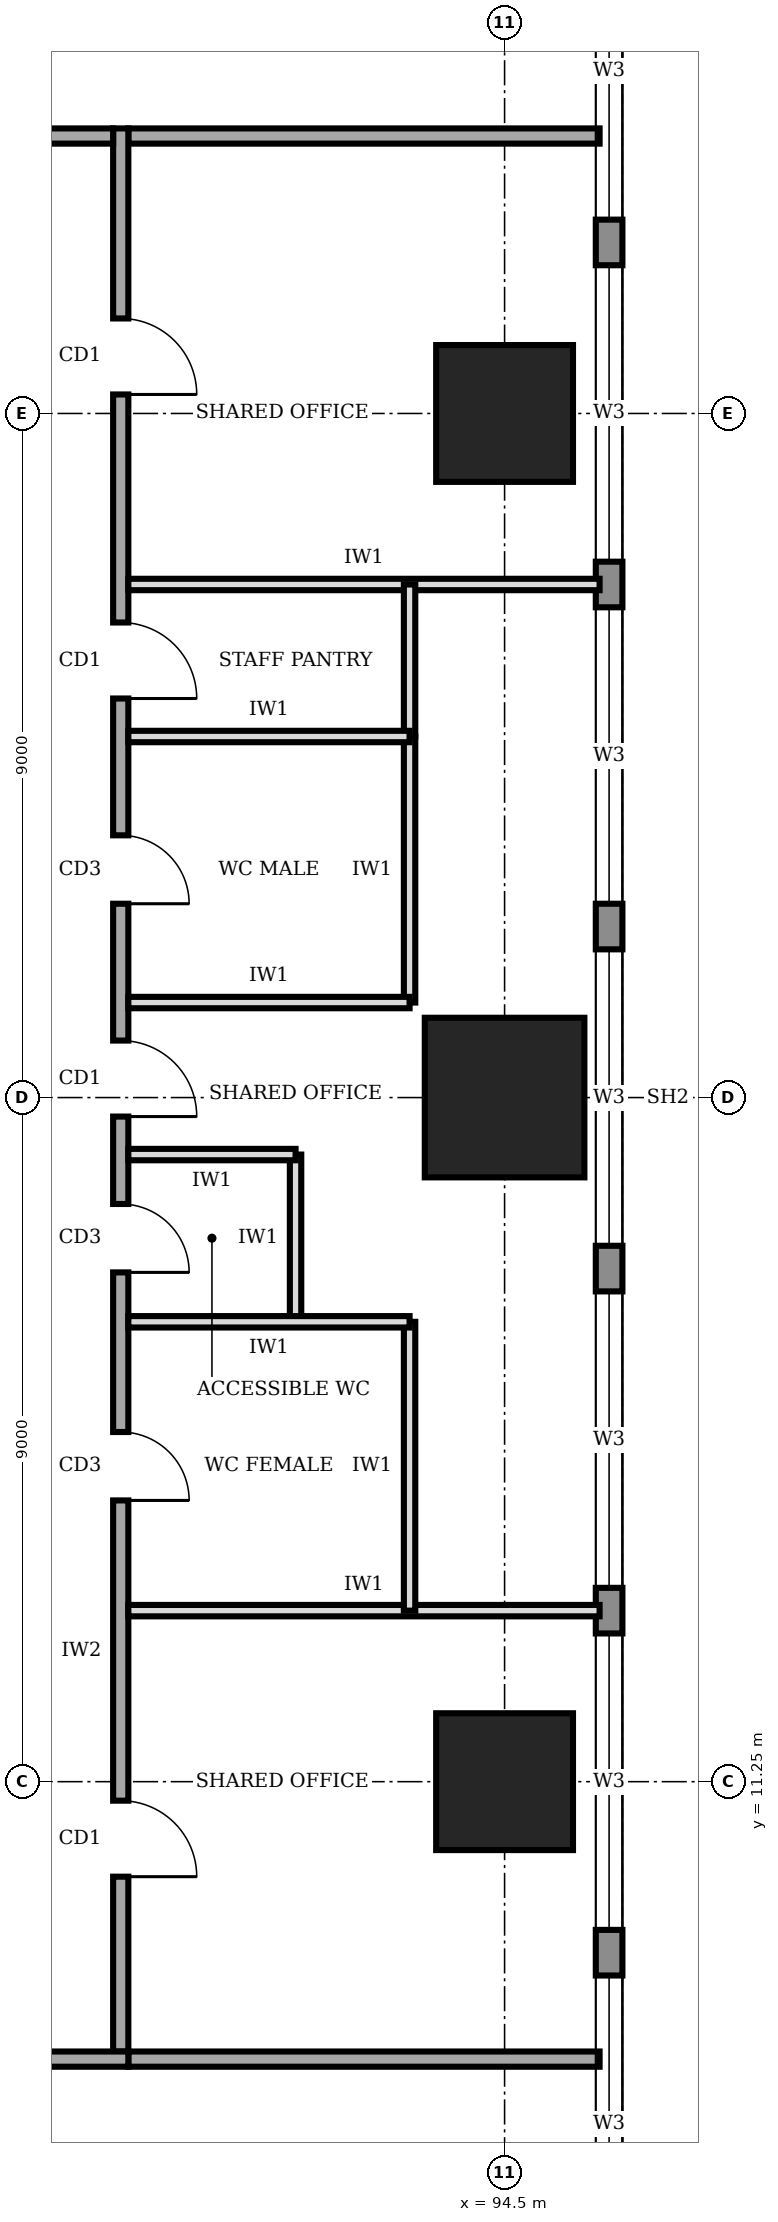
"""IFC4 building model, lengths in metres.
Left out: names, types, materials, properties, quantities, classifications, styles, units other than length and angle.
Written with IfcOpenShell. Run it as: python <this file> out.ifc"""

import sys

from ifc_helpers import new_model, si_unit, direction, frame, frame_2d, origin, origin_2d, place, context, subcontext, project, spatial, rectangle, extrude, element, fill, save


model = new_model("IFC4")
c1 = context("Model", 3, precision=1e-05, world=origin(), true_north=direction((0.0, 1.0)))
c2 = subcontext(c1, "Body", "Model", "MODEL_VIEW")
j1 = project(units=[si_unit("LENGTHUNIT", "METRE"), si_unit("PLANEANGLEUNIT", "RADIAN")], contexts=[c1])
p1 = place(None, origin())
s1 = spatial("IfcSite", under=j1, at=p1, CompositionType="ELEMENT")
p2 = place(p1, origin())
s2 = spatial("IfcBuilding", under=s1, at=p2, CompositionType="ELEMENT")
p3 = place(p2, frame((0.0, 0.0, 193.0)))
s3 = spatial("IfcBuildingStorey", under=s2, at=p3, CompositionType="ELEMENT", Elevation=193.0)
p4 = place(p3, frame((94.5, 11.25, 0.0), z_axis=(0.0, 0.0, 1.0), x_axis=(1.0, 0.0, 0.0)))
e1 = element("IfcColumn", 1, at=p4, inside=s3, PredefinedType="COLUMN", context=c2, shape_type="SweptSolid", body=[
    extrude(rectangle(XDim=1.8, YDim=1.8, at=origin_2d()), origin(), (0.0, 0.0, 1.0), 4.0),
])
p5 = place(p3, frame((94.5, 20.25, 0.0), z_axis=(0.0, 0.0, 1.0), x_axis=(1.0, 0.0, 0.0)))
e2 = element("IfcColumn", 2, at=p5, inside=s3, PredefinedType="COLUMN", context=c2, shape_type="SweptSolid", body=[
    extrude(rectangle(XDim=2.1, YDim=2.1, at=origin_2d()), origin(), (0.0, 0.0, 1.0), 4.0),
])
p6 = place(p3, frame((94.5, 29.25, 0.0), z_axis=(0.0, 0.0, 1.0), x_axis=(1.0, 0.0, 0.0)))
e3 = element("IfcColumn", 3, at=p6, inside=s3, PredefinedType="COLUMN", context=c2, shape_type="SweptSolid", body=[
    extrude(rectangle(XDim=1.8, YDim=1.8, at=origin_2d()), origin(), (0.0, 0.0, 1.0), 4.0),
])
p7 = place(p3, frame((95.875, 3.32, 0.0), z_axis=(0.0, 0.0, 1.0), x_axis=(0.0, 1.0, 0.0)))
e4 = element("IfcWall", 4, at=p7, inside=s3, PredefinedType="STANDARD", context=c2, shape_type="SweptSolid", body=[
    extrude(rectangle(XDim=33.86, YDim=0.35, at=frame_2d((16.93, 0.0))), origin(), (0.0, 0.0, 1.0), 3.75),
])
p8 = place(p7, frame((1.48, 0.0, 0.95)))
e5 = element("IfcOpeningElement", 5, at=p8, cuts=e4, PredefinedType="OPENING", context=c2, shape_type="SweptSolid", body=[
    extrude(rectangle(XDim=3.9, YDim=1.8, at=frame_2d((1.95, 0.9))), frame((0.0, 0.185, 0.0), z_axis=(0.0, -1.0, 0.0), x_axis=(1.0, 0.0, 0.0)), (0.0, 0.0, 1.0), 0.37),
])
p9 = place(p7, frame((5.98, 0.0, 0.95)))
e6 = element("IfcOpeningElement", 6, at=p9, cuts=e4, PredefinedType="OPENING", context=c2, shape_type="SweptSolid", body=[
    extrude(rectangle(XDim=3.9, YDim=1.8, at=frame_2d((1.95, 0.9))), frame((0.0, 0.185, 0.0), z_axis=(0.0, -1.0, 0.0), x_axis=(1.0, 0.0, 0.0)), (0.0, 0.0, 1.0), 0.37),
])
p10 = place(p7, frame((10.48, 0.0, 0.95)))
e7 = element("IfcOpeningElement", 7, at=p10, cuts=e4, PredefinedType="OPENING", context=c2, shape_type="SweptSolid", body=[
    extrude(rectangle(XDim=3.9, YDim=1.8, at=frame_2d((1.95, 0.9))), frame((0.0, 0.185, 0.0), z_axis=(0.0, -1.0, 0.0), x_axis=(1.0, 0.0, 0.0)), (0.0, 0.0, 1.0), 0.37),
])
p11 = place(p7, frame((14.98, 0.0, 0.95)))
e8 = element("IfcOpeningElement", 8, at=p11, cuts=e4, PredefinedType="OPENING", context=c2, shape_type="SweptSolid", body=[
    extrude(rectangle(XDim=3.9, YDim=1.8, at=frame_2d((1.95, 0.9))), frame((0.0, 0.185, 0.0), z_axis=(0.0, -1.0, 0.0), x_axis=(1.0, 0.0, 0.0)), (0.0, 0.0, 1.0), 0.37),
])
p12 = place(p7, frame((19.48, 0.0, 0.95)))
e9 = element("IfcOpeningElement", 9, at=p12, cuts=e4, PredefinedType="OPENING", context=c2, shape_type="SweptSolid", body=[
    extrude(rectangle(XDim=3.9, YDim=1.8, at=frame_2d((1.95, 0.9))), frame((0.0, 0.185, 0.0), z_axis=(0.0, -1.0, 0.0), x_axis=(1.0, 0.0, 0.0)), (0.0, 0.0, 1.0), 0.37),
])
p13 = place(p7, frame((23.98, 0.0, 0.95)))
e10 = element("IfcOpeningElement", 10, at=p13, cuts=e4, PredefinedType="OPENING", context=c2, shape_type="SweptSolid", body=[
    extrude(rectangle(XDim=3.9, YDim=1.8, at=frame_2d((1.95, 0.9))), frame((0.0, 0.185, 0.0), z_axis=(0.0, -1.0, 0.0), x_axis=(1.0, 0.0, 0.0)), (0.0, 0.0, 1.0), 0.37),
])
p14 = place(p7, frame((28.48, 0.0, 0.95)))
e11 = element("IfcOpeningElement", 11, at=p14, cuts=e4, PredefinedType="OPENING", context=c2, shape_type="SweptSolid", body=[
    extrude(rectangle(XDim=3.9, YDim=1.8, at=frame_2d((1.95, 0.9))), frame((0.0, 0.185, 0.0), z_axis=(0.0, -1.0, 0.0), x_axis=(1.0, 0.0, 0.0)), (0.0, 0.0, 1.0), 0.37),
])
p15 = place(p3, frame((72.65, 7.6, 0.0), z_axis=(0.0, 0.0, 1.0), x_axis=(1.0, 0.0, 0.0)))
e12 = element("IfcWall", 12, at=p15, inside=s3, PredefinedType="SOLIDWALL", context=c2, shape_type="SweptSolid", body=[
    extrude(rectangle(XDim=16.9, YDim=0.2, at=frame_2d((8.45, 0.0))), origin(), (0.0, 0.0, 1.0), 3.75),
])
p16 = place(p15, frame((3.575, 0.0, 0.0)))
e13 = element("IfcOpeningElement", 13, at=p16, cuts=e12, PredefinedType="OPENING", context=c2, shape_type="SweptSolid", body=[
    extrude(rectangle(XDim=1.0, YDim=2.1, at=frame_2d((0.5, 1.05))), frame((0.0, 0.11, 0.0), z_axis=(0.0, -1.0, 0.0), x_axis=(1.0, 0.0, 0.0)), (0.0, 0.0, 1.0), 0.22),
])
p17 = place(p3, frame((89.45, 7.7, 0.0), z_axis=(0.0, 0.0, 1.0), x_axis=(0.0, 1.0, 0.0)))
e14 = element("IfcWall", 14, at=p17, inside=s3, PredefinedType="SOLIDWALL", context=c2, shape_type="SweptSolid", body=[
    extrude(rectangle(XDim=25.3, YDim=0.2, at=frame_2d((12.65, 0.0))), origin(), (0.0, 0.0, 1.0), 3.75),
])
p18 = place(p17, frame((2.3, 0.0, 0.0)))
e15 = element("IfcOpeningElement", 15, at=p18, cuts=e14, PredefinedType="OPENING", context=c2, shape_type="SweptSolid", body=[
    extrude(rectangle(XDim=1.0, YDim=2.1, at=frame_2d((0.5, 1.05))), frame((0.0, 0.11, 0.0), z_axis=(0.0, -1.0, 0.0), x_axis=(1.0, 0.0, 0.0)), (0.0, 0.0, 1.0), 0.22),
])
p19 = place(p17, frame((7.25, 0.0, 0.0)))
e16 = element("IfcOpeningElement", 16, at=p19, cuts=e14, PredefinedType="OPENING", context=c2, shape_type="SweptSolid", body=[
    extrude(rectangle(XDim=0.9, YDim=2.1, at=frame_2d((0.45, 1.05))), frame((0.0, 0.11, 0.0), z_axis=(0.0, -1.0, 0.0), x_axis=(1.0, 0.0, 0.0)), (0.0, 0.0, 1.0), 0.22),
])
p20 = place(p17, frame((10.25, 0.0, 0.0)))
e17 = element("IfcOpeningElement", 17, at=p20, cuts=e14, PredefinedType="OPENING", context=c2, shape_type="SweptSolid", body=[
    extrude(rectangle(XDim=0.9, YDim=2.1, at=frame_2d((0.45, 1.05))), frame((0.0, 0.11, 0.0), z_axis=(0.0, -1.0, 0.0), x_axis=(1.0, 0.0, 0.0)), (0.0, 0.0, 1.0), 0.22),
])
p21 = place(p17, frame((15.1, 0.0, 0.0)))
e18 = element("IfcOpeningElement", 18, at=p21, cuts=e14, PredefinedType="OPENING", context=c2, shape_type="SweptSolid", body=[
    extrude(rectangle(XDim=0.9, YDim=2.1, at=frame_2d((0.45, 1.05))), frame((0.0, 0.11, 0.0), z_axis=(0.0, -1.0, 0.0), x_axis=(1.0, 0.0, 0.0)), (0.0, 0.0, 1.0), 0.22),
])
p22 = place(p17, frame((17.8, 0.0, 0.0)))
e19 = element("IfcOpeningElement", 19, at=p22, cuts=e14, PredefinedType="OPENING", context=c2, shape_type="SweptSolid", body=[
    extrude(rectangle(XDim=1.0, YDim=2.1, at=frame_2d((0.5, 1.05))), frame((0.0, 0.11, 0.0), z_axis=(0.0, -1.0, 0.0), x_axis=(1.0, 0.0, 0.0)), (0.0, 0.0, 1.0), 0.22),
])
p23 = place(p17, frame((12.3, 0.0, 0.0)))
e20 = element("IfcOpeningElement", 20, at=p23, cuts=e14, PredefinedType="OPENING", context=c2, shape_type="SweptSolid", body=[
    extrude(rectangle(XDim=1.0, YDim=2.1, at=frame_2d((0.5, 1.05))), frame((0.0, 0.11, 0.0), z_axis=(0.0, -1.0, 0.0), x_axis=(1.0, 0.0, 0.0)), (0.0, 0.0, 1.0), 0.22),
])
p24 = place(p17, frame((21.8, 0.0, 0.0)))
e21 = element("IfcOpeningElement", 21, at=p24, cuts=e14, PredefinedType="OPENING", context=c2, shape_type="SweptSolid", body=[
    extrude(rectangle(XDim=1.0, YDim=2.1, at=frame_2d((0.5, 1.05))), frame((0.0, 0.11, 0.0), z_axis=(0.0, -1.0, 0.0), x_axis=(1.0, 0.0, 0.0)), (0.0, 0.0, 1.0), 0.22),
])
p25 = place(p3, frame((89.35, 32.9, 0.0), z_axis=(0.0, 0.0, 1.0), x_axis=(-1.0, 0.0, 0.0)))
e22 = element("IfcWall", 22, at=p25, inside=s3, PredefinedType="SOLIDWALL", context=c2, shape_type="SweptSolid", body=[
    extrude(rectangle(XDim=16.9, YDim=0.2, at=frame_2d((8.45, 0.0))), origin(), (0.0, 0.0, 1.0), 3.75),
])
p26 = place(p25, frame((14.375, 0.0, 0.0)))
e23 = element("IfcOpeningElement", 23, at=p26, cuts=e22, PredefinedType="OPENING", context=c2, shape_type="SweptSolid", body=[
    extrude(rectangle(XDim=1.0, YDim=2.1, at=frame_2d((0.5, 1.05))), frame((0.0, 0.11, 0.0), z_axis=(0.0, -1.0, 0.0), x_axis=(1.0, 0.0, 0.0)), (0.0, 0.0, 1.0), 0.22),
])
for number, where, z_axis, x_axis in (
    (24, (89.55, 7.6, 0.0), (0.0, 0.0, 1.0), (1.0, 0.0, 0.0)),
    (25, (89.55, 32.9, 0.0), (0.0, 0.0, 1.0), (1.0, 0.0, 0.0)),
):
    element("IfcWall", number, at=place(p3, frame(where, z_axis=z_axis, x_axis=x_axis)), inside=s3, PredefinedType="SOLIDWALL", context=c2, shape_type="SweptSolid", body=[
        extrude(rectangle(XDim=6.2, YDim=0.2, at=frame_2d((3.1, 0.0))), origin(), (0.0, 0.0, 1.0), 3.75),
    ])
for number, where, z_axis, x_axis in (
    (26, (89.55, 13.5, 0.0), (0.0, 0.0, 1.0), (1.0, 0.0, 0.0)),
    (27, (89.55, 27.0, 0.0), (0.0, 0.0, 1.0), (1.0, 0.0, 0.0)),
):
    element("IfcWall", number, at=place(p3, frame(where, z_axis=z_axis, x_axis=x_axis)), inside=s3, PredefinedType="PARTITIONING", context=c2, shape_type="SweptSolid", body=[
        extrude(rectangle(XDim=6.2, YDim=0.15, at=frame_2d((3.1, 0.0))), origin(), (0.0, 0.0, 1.0), 3.75),
    ])
p27 = place(p3, frame((89.55, 17.3, 0.0), z_axis=(0.0, 0.0, 1.0), x_axis=(1.0, 0.0, 0.0)))
e28 = element("IfcWall", 28, at=p27, inside=s3, PredefinedType="PARTITIONING", context=c2, shape_type="SweptSolid", body=[
    extrude(rectangle(XDim=3.7, YDim=0.15, at=frame_2d((1.85, 0.0))), origin(), (0.0, 0.0, 1.0), 3.75),
])
p28 = place(p3, frame((89.55, 19.5, 0.0), z_axis=(0.0, 0.0, 1.0), x_axis=(1.0, 0.0, 0.0)))
e29 = element("IfcWall", 29, at=p28, inside=s3, PredefinedType="PARTITIONING", context=c2, shape_type="SweptSolid", body=[
    extrude(rectangle(XDim=2.2, YDim=0.15, at=frame_2d((1.1, 0.0))), origin(), (0.0, 0.0, 1.0), 2.85),
])
for number, where, z_axis, x_axis in (
    (30, (89.55, 21.5, 0.0), (0.0, 0.0, 1.0), (1.0, 0.0, 0.0)),
    (31, (89.55, 25.0, 0.0), (0.0, 0.0, 1.0), (1.0, 0.0, 0.0)),
):
    element("IfcWall", number, at=place(p3, frame(where, z_axis=z_axis, x_axis=x_axis)), inside=s3, PredefinedType="PARTITIONING", context=c2, shape_type="SweptSolid", body=[
        extrude(rectangle(XDim=3.7, YDim=0.15, at=frame_2d((1.85, 0.0))), origin(), (0.0, 0.0, 1.0), 3.75),
    ])
p29 = place(p3, frame((93.25, 13.5, 0.0), z_axis=(0.0, 0.0, 1.0), x_axis=(0.0, 1.0, 0.0)))
e32 = element("IfcWall", 32, at=p29, inside=s3, PredefinedType="PARTITIONING", context=c2, shape_type="SweptSolid", body=[
    extrude(rectangle(XDim=3.8, YDim=0.15, at=frame_2d((1.9, 0.0))), origin(), (0.0, 0.0, 1.0), 3.75),
])
p30 = place(p3, frame((91.75, 17.3, 0.0), z_axis=(0.0, 0.0, 1.0), x_axis=(0.0, 1.0, 0.0)))
e33 = element("IfcWall", 33, at=p30, inside=s3, PredefinedType="PARTITIONING", context=c2, shape_type="SweptSolid", body=[
    extrude(rectangle(XDim=2.2, YDim=0.15, at=frame_2d((1.1, 0.0))), origin(), (0.0, 0.0, 1.0), 3.75),
])
p31 = place(p3, frame((93.25, 21.5, 0.0), z_axis=(0.0, 0.0, 1.0), x_axis=(0.0, 1.0, 0.0)))
e34 = element("IfcWall", 34, at=p31, inside=s3, PredefinedType="PARTITIONING", context=c2, shape_type="SweptSolid", body=[
    extrude(rectangle(XDim=3.5, YDim=0.15, at=frame_2d((1.75, 0.0))), origin(), (0.0, 0.0, 1.0), 3.75),
])
p32 = place(p3, frame((93.25, 25.0, 0.0), z_axis=(0.0, 0.0, 1.0), x_axis=(0.0, 1.0, 0.0)))
e35 = element("IfcWall", 35, at=p32, inside=s3, PredefinedType="PARTITIONING", context=c2, shape_type="SweptSolid", body=[
    extrude(rectangle(XDim=2.0, YDim=0.15, at=frame_2d((1.0, 0.0))), origin(), (0.0, 0.0, 1.0), 3.75),
])
p33 = place(p8, origin())
e36 = element("IfcWindow", 36, at=p33, inside=s3, PartitioningType="SINGLE_PANEL", PredefinedType="WINDOW", context=c2, shape_type="SweptSolid", body=[
    extrude(rectangle(XDim=3.9, YDim=1.8, at=frame_2d((1.95, 0.9))), frame((0.0, 0.03, 0.0), z_axis=(0.0, -1.0, 0.0), x_axis=(1.0, 0.0, 0.0)), (0.0, 0.0, 1.0), 0.06),
])
fill(e5, e36)
p34 = place(p9, origin())
e37 = element("IfcWindow", 37, at=p34, inside=s3, PartitioningType="SINGLE_PANEL", PredefinedType="WINDOW", context=c2, shape_type="SweptSolid", body=[
    extrude(rectangle(XDim=3.9, YDim=1.8, at=frame_2d((1.95, 0.9))), frame((0.0, 0.03, 0.0), z_axis=(0.0, -1.0, 0.0), x_axis=(1.0, 0.0, 0.0)), (0.0, 0.0, 1.0), 0.06),
])
fill(e6, e37)
p35 = place(p10, origin())
e38 = element("IfcWindow", 38, at=p35, inside=s3, PartitioningType="SINGLE_PANEL", PredefinedType="WINDOW", context=c2, shape_type="SweptSolid", body=[
    extrude(rectangle(XDim=3.9, YDim=1.8, at=frame_2d((1.95, 0.9))), frame((0.0, 0.03, 0.0), z_axis=(0.0, -1.0, 0.0), x_axis=(1.0, 0.0, 0.0)), (0.0, 0.0, 1.0), 0.06),
])
fill(e7, e38)
p36 = place(p11, origin())
e39 = element("IfcWindow", 39, at=p36, inside=s3, PartitioningType="SINGLE_PANEL", PredefinedType="WINDOW", context=c2, shape_type="SweptSolid", body=[
    extrude(rectangle(XDim=3.9, YDim=1.8, at=frame_2d((1.95, 0.9))), frame((0.0, 0.03, 0.0), z_axis=(0.0, -1.0, 0.0), x_axis=(1.0, 0.0, 0.0)), (0.0, 0.0, 1.0), 0.06),
])
fill(e8, e39)
p37 = place(p12, origin())
e40 = element("IfcWindow", 40, at=p37, inside=s3, PartitioningType="SINGLE_PANEL", PredefinedType="WINDOW", context=c2, shape_type="SweptSolid", body=[
    extrude(rectangle(XDim=3.9, YDim=1.8, at=frame_2d((1.95, 0.9))), frame((0.0, 0.03, 0.0), z_axis=(0.0, -1.0, 0.0), x_axis=(1.0, 0.0, 0.0)), (0.0, 0.0, 1.0), 0.06),
])
fill(e9, e40)
p38 = place(p13, origin())
e41 = element("IfcWindow", 41, at=p38, inside=s3, PartitioningType="SINGLE_PANEL", PredefinedType="WINDOW", context=c2, shape_type="SweptSolid", body=[
    extrude(rectangle(XDim=3.9, YDim=1.8, at=frame_2d((1.95, 0.9))), frame((0.0, 0.03, 0.0), z_axis=(0.0, -1.0, 0.0), x_axis=(1.0, 0.0, 0.0)), (0.0, 0.0, 1.0), 0.06),
])
fill(e10, e41)
p39 = place(p14, origin())
e42 = element("IfcWindow", 42, at=p39, inside=s3, PartitioningType="SINGLE_PANEL", PredefinedType="WINDOW", context=c2, shape_type="SweptSolid", body=[
    extrude(rectangle(XDim=3.9, YDim=1.8, at=frame_2d((1.95, 0.9))), frame((0.0, 0.03, 0.0), z_axis=(0.0, -1.0, 0.0), x_axis=(1.0, 0.0, 0.0)), (0.0, 0.0, 1.0), 0.06),
])
fill(e11, e42)
p40 = place(p18, frame((1.0, 0.0, 0.0), z_axis=(0.0, 0.0, 1.0), x_axis=(-1.0, 0.0, 0.0)))
e43 = element("IfcDoor", 43, at=p40, inside=s3, OperationType="SINGLE_SWING_RIGHT", PredefinedType="DOOR", context=c2, shape_type="SweptSolid", body=[
    extrude(rectangle(XDim=1.0, YDim=2.1, at=frame_2d((0.5, 1.05))), frame((0.0, 0.025, 0.0), z_axis=(0.0, -1.0, 0.0), x_axis=(1.0, 0.0, 0.0)), (0.0, 0.0, 1.0), 0.05),
])
fill(e15, e43)
p41 = place(p19, frame((0.9, 0.0, 0.0), z_axis=(0.0, 0.0, 1.0), x_axis=(-1.0, 0.0, 0.0)))
e44 = element("IfcDoor", 44, at=p41, inside=s3, OperationType="SINGLE_SWING_RIGHT", PredefinedType="DOOR", context=c2, shape_type="SweptSolid", body=[
    extrude(rectangle(XDim=0.9, YDim=2.1, at=frame_2d((0.45, 1.05))), frame((0.0, 0.025, 0.0), z_axis=(0.0, -1.0, 0.0), x_axis=(1.0, 0.0, 0.0)), (0.0, 0.0, 1.0), 0.05),
])
fill(e16, e44)
p42 = place(p20, frame((0.9, 0.0, 0.0), z_axis=(0.0, 0.0, 1.0), x_axis=(-1.0, 0.0, 0.0)))
e45 = element("IfcDoor", 45, at=p42, inside=s3, OperationType="SINGLE_SWING_RIGHT", PredefinedType="DOOR", context=c2, shape_type="SweptSolid", body=[
    extrude(rectangle(XDim=0.9, YDim=2.1, at=frame_2d((0.45, 1.05))), frame((0.0, 0.025, 0.0), z_axis=(0.0, -1.0, 0.0), x_axis=(1.0, 0.0, 0.0)), (0.0, 0.0, 1.0), 0.05),
])
fill(e17, e45)
p43 = place(p21, frame((0.9, 0.0, 0.0), z_axis=(0.0, 0.0, 1.0), x_axis=(-1.0, 0.0, 0.0)))
e46 = element("IfcDoor", 46, at=p43, inside=s3, OperationType="SINGLE_SWING_RIGHT", PredefinedType="DOOR", context=c2, shape_type="SweptSolid", body=[
    extrude(rectangle(XDim=0.9, YDim=2.1, at=frame_2d((0.45, 1.05))), frame((0.0, 0.025, 0.0), z_axis=(0.0, -1.0, 0.0), x_axis=(1.0, 0.0, 0.0)), (0.0, 0.0, 1.0), 0.05),
])
fill(e18, e46)
p44 = place(p22, frame((1.0, 0.0, 0.0), z_axis=(0.0, 0.0, 1.0), x_axis=(-1.0, 0.0, 0.0)))
e47 = element("IfcDoor", 47, at=p44, inside=s3, OperationType="SINGLE_SWING_RIGHT", PredefinedType="DOOR", context=c2, shape_type="SweptSolid", body=[
    extrude(rectangle(XDim=1.0, YDim=2.1, at=frame_2d((0.5, 1.05))), frame((0.0, 0.025, 0.0), z_axis=(0.0, -1.0, 0.0), x_axis=(1.0, 0.0, 0.0)), (0.0, 0.0, 1.0), 0.05),
])
fill(e19, e47)
p45 = place(p23, frame((1.0, 0.0, 0.0), z_axis=(0.0, 0.0, 1.0), x_axis=(-1.0, 0.0, 0.0)))
e48 = element("IfcDoor", 48, at=p45, inside=s3, OperationType="SINGLE_SWING_RIGHT", PredefinedType="DOOR", context=c2, shape_type="SweptSolid", body=[
    extrude(rectangle(XDim=1.0, YDim=2.1, at=frame_2d((0.5, 1.05))), frame((0.0, 0.025, 0.0), z_axis=(0.0, -1.0, 0.0), x_axis=(1.0, 0.0, 0.0)), (0.0, 0.0, 1.0), 0.05),
])
fill(e20, e48)
p46 = place(p24, frame((1.0, 0.0, 0.0), z_axis=(0.0, 0.0, 1.0), x_axis=(-1.0, 0.0, 0.0)))
e49 = element("IfcDoor", 49, at=p46, inside=s3, OperationType="SINGLE_SWING_RIGHT", PredefinedType="DOOR", context=c2, shape_type="SweptSolid", body=[
    extrude(rectangle(XDim=1.0, YDim=2.1, at=frame_2d((0.5, 1.05))), frame((0.0, 0.025, 0.0), z_axis=(0.0, -1.0, 0.0), x_axis=(1.0, 0.0, 0.0)), (0.0, 0.0, 1.0), 0.05),
])
fill(e21, e49)
save(model, sys.argv[1])
